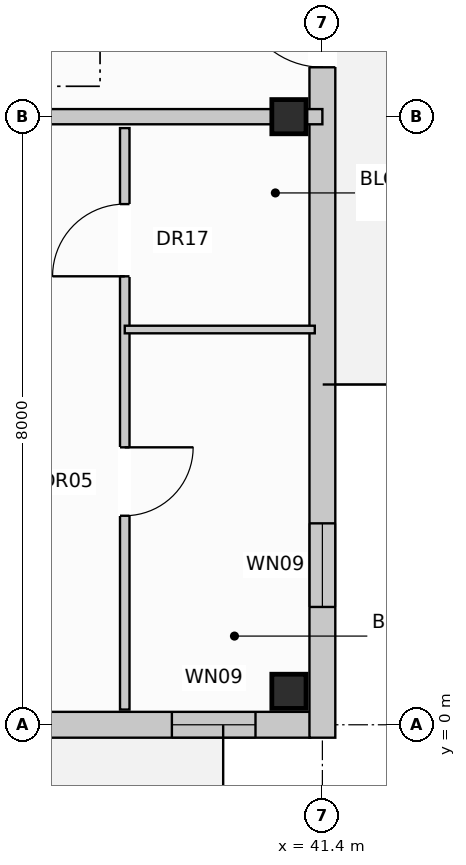
"""IFC4 building model, lengths in metres.
Left out: names, types, materials, properties, quantities, classifications, styles, units other than length and angle.
Written with IfcOpenShell. Run it as: python <this file> out.ifc"""

import sys

from ifc_helpers import new_model, si_unit, direction, frame, frame_2d, origin, origin_with_axes, origin_2d, place, context, subcontext, project, spatial, rectangle, extrude, element, fill, save


model = new_model("IFC4")
c1 = context("Model", 3, precision=1e-05, world=origin(), true_north=direction((0.0, 1.0)))
c2 = subcontext(c1, "Body", "Model", "MODEL_VIEW")
j1 = project(units=[si_unit("LENGTHUNIT", "METRE"), si_unit("PLANEANGLEUNIT", "RADIAN")], contexts=[c1])
p1 = place(None, origin())
s1 = spatial("IfcSite", under=j1, at=p1, CompositionType="ELEMENT")
p2 = place(p1, origin())
s2 = spatial("IfcBuilding", under=s1, at=p2, CompositionType="ELEMENT")
p3 = place(p2, frame((0.0, 0.0, 33.6)))
s3 = spatial("IfcBuildingStorey", under=s2, at=p3, CompositionType="ELEMENT", Elevation=33.6)
for number, where, z_axis, x_axis in (
    (1, (40.96, 0.44, 0.0), (0.0, 0.0, 1.0), (1.0, 0.0, 0.0)),
    (2, (40.96, 8.0, 0.0), (0.0, 0.0, 1.0), (1.0, 0.0, 0.0)),
):
    element("IfcColumn", number, at=place(p3, frame(where, z_axis=z_axis, x_axis=x_axis)), inside=s3, PredefinedType="COLUMN", context=c2, shape_type="SweptSolid", body=[
        extrude(rectangle(XDim=0.45, YDim=0.45, at=origin_2d()), origin(), (0.0, 0.0, 1.0), 3.2),
    ])
p4 = place(p3, frame((0.16, 0.0, 0.0), z_axis=(0.0, 0.0, 1.0), x_axis=(1.0, 0.0, 0.0)))
e3 = element("IfcWall", 3, at=p4, inside=s3, PredefinedType="STANDARD", context=c2, shape_type="SweptSolid", body=[
    extrude(rectangle(XDim=41.08, YDim=0.34, at=frame_2d((20.54, 0.0))), origin(), (0.0, 0.0, 1.0), 2.96),
])
p5 = place(p4, frame((2.465, 0.0, 0.0)))
e4 = element("IfcOpeningElement", 4, at=p5, cuts=e3, PredefinedType="OPENING", context=c2, shape_type="SweptSolid", body=[
    extrude(rectangle(XDim=1.05, YDim=2.12, at=frame_2d((0.525, 1.06))), frame((0.0, 0.182, 0.0), z_axis=(0.0, -1.0, 0.0), x_axis=(1.0, 0.0, 0.0)), (0.0, 0.0, 1.0), 0.364),
])
p6 = place(p4, frame((18.86, 0.0, 0.0)))
e5 = element("IfcOpeningElement", 5, at=p6, cuts=e3, PredefinedType="OPENING", context=c2, shape_type="SweptSolid", body=[
    extrude(rectangle(XDim=1.05, YDim=2.12, at=frame_2d((0.525, 1.06))), frame((0.0, 0.182, 0.0), z_axis=(0.0, -1.0, 0.0), x_axis=(1.0, 0.0, 0.0)), (0.0, 0.0, 1.0), 0.364),
])
p7 = place(p4, frame((32.66, 0.0, 0.0)))
e6 = element("IfcOpeningElement", 6, at=p7, cuts=e3, PredefinedType="OPENING", context=c2, shape_type="SweptSolid", body=[
    extrude(rectangle(XDim=1.05, YDim=2.12, at=frame_2d((0.525, 1.06))), frame((0.0, 0.182, 0.0), z_axis=(0.0, -1.0, 0.0), x_axis=(1.0, 0.0, 0.0)), (0.0, 0.0, 1.0), 0.364),
])
p8 = place(p4, frame((0.76, 0.0, 0.72)))
e7 = element("IfcOpeningElement", 7, at=p8, cuts=e3, PredefinedType="OPENING", context=c2, shape_type="SweptSolid", body=[
    extrude(rectangle(XDim=1.1, YDim=1.5, at=frame_2d((0.55, 0.75))), frame((0.0, 0.182, 0.0), z_axis=(0.0, -1.0, 0.0), x_axis=(1.0, 0.0, 0.0)), (0.0, 0.0, 1.0), 0.364),
])
p9 = place(p4, frame((4.26, 0.0, 0.72)))
e8 = element("IfcOpeningElement", 8, at=p9, cuts=e3, PredefinedType="OPENING", context=c2, shape_type="SweptSolid", body=[
    extrude(rectangle(XDim=1.9, YDim=1.85, at=frame_2d((0.95, 0.925))), frame((0.0, 0.182, 0.0), z_axis=(0.0, -1.0, 0.0), x_axis=(1.0, 0.0, 0.0)), (0.0, 0.0, 1.0), 0.364),
])
p10 = place(p4, frame((7.935, 0.0, 0.8)))
e9 = element("IfcOpeningElement", 9, at=p10, cuts=e3, PredefinedType="OPENING", context=c2, shape_type="SweptSolid", body=[
    extrude(rectangle(XDim=1.95, YDim=1.65, at=frame_2d((0.975, 0.825))), frame((0.0, 0.182, 0.0), z_axis=(0.0, -1.0, 0.0), x_axis=(1.0, 0.0, 0.0)), (0.0, 0.0, 1.0), 0.364),
])
p11 = place(p4, frame((11.66, 0.0, 0.72)))
e10 = element("IfcOpeningElement", 10, at=p11, cuts=e3, PredefinedType="OPENING", context=c2, shape_type="SweptSolid", body=[
    extrude(rectangle(XDim=1.1, YDim=1.5, at=frame_2d((0.55, 0.75))), frame((0.0, 0.182, 0.0), z_axis=(0.0, -1.0, 0.0), x_axis=(1.0, 0.0, 0.0)), (0.0, 0.0, 1.0), 0.364),
])
p12 = place(p4, frame((16.735, 0.0, 0.8)))
e11 = element("IfcOpeningElement", 11, at=p12, cuts=e3, PredefinedType="OPENING", context=c2, shape_type="SweptSolid", body=[
    extrude(rectangle(XDim=1.9, YDim=1.85, at=frame_2d((0.95, 0.925))), frame((0.0, 0.182, 0.0), z_axis=(0.0, -1.0, 0.0), x_axis=(1.0, 0.0, 0.0)), (0.0, 0.0, 1.0), 0.364),
])
p13 = place(p4, frame((22.235, 0.0, 0.8)))
e12 = element("IfcOpeningElement", 12, at=p13, cuts=e3, PredefinedType="OPENING", context=c2, shape_type="SweptSolid", body=[
    extrude(rectangle(XDim=1.95, YDim=1.65, at=frame_2d((0.975, 0.825))), frame((0.0, 0.182, 0.0), z_axis=(0.0, -1.0, 0.0), x_axis=(1.0, 0.0, 0.0)), (0.0, 0.0, 1.0), 0.364),
])
p14 = place(p4, frame((28.36, 0.0, 0.72)))
e13 = element("IfcOpeningElement", 13, at=p14, cuts=e3, PredefinedType="OPENING", context=c2, shape_type="SweptSolid", body=[
    extrude(rectangle(XDim=1.1, YDim=1.5, at=frame_2d((0.55, 0.75))), frame((0.0, 0.182, 0.0), z_axis=(0.0, -1.0, 0.0), x_axis=(1.0, 0.0, 0.0)), (0.0, 0.0, 1.0), 0.364),
])
p15 = place(p4, frame((30.46, 0.0, 0.8)))
e14 = element("IfcOpeningElement", 14, at=p15, cuts=e3, PredefinedType="OPENING", context=c2, shape_type="SweptSolid", body=[
    extrude(rectangle(XDim=1.9, YDim=1.85, at=frame_2d((0.95, 0.925))), frame((0.0, 0.182, 0.0), z_axis=(0.0, -1.0, 0.0), x_axis=(1.0, 0.0, 0.0)), (0.0, 0.0, 1.0), 0.364),
])
p16 = place(p4, frame((35.535, 0.0, 0.8)))
e15 = element("IfcOpeningElement", 15, at=p16, cuts=e3, PredefinedType="OPENING", context=c2, shape_type="SweptSolid", body=[
    extrude(rectangle(XDim=1.95, YDim=1.65, at=frame_2d((0.975, 0.825))), frame((0.0, 0.182, 0.0), z_axis=(0.0, -1.0, 0.0), x_axis=(1.0, 0.0, 0.0)), (0.0, 0.0, 1.0), 0.364),
])
p17 = place(p4, frame((39.26, 0.0, 0.72)))
e16 = element("IfcOpeningElement", 16, at=p17, cuts=e3, PredefinedType="OPENING", context=c2, shape_type="SweptSolid", body=[
    extrude(rectangle(XDim=1.1, YDim=1.5, at=frame_2d((0.55, 0.75))), frame((0.0, 0.182, 0.0), z_axis=(0.0, -1.0, 0.0), x_axis=(1.0, 0.0, 0.0)), (0.0, 0.0, 1.0), 0.364),
])
p18 = place(p3, frame((41.4, -0.17, 0.0), z_axis=(0.0, 0.0, 1.0), x_axis=(0.0, 1.0, 0.0)))
e17 = element("IfcWall", 17, at=p18, inside=s3, PredefinedType="STANDARD", context=c2, shape_type="SweptSolid", body=[
    extrude(rectangle(XDim=18.74, YDim=0.34, at=frame_2d((9.37, 0.0))), origin(), (0.0, 0.0, 1.0), 2.96),
])
p19 = place(p18, frame((8.82, 0.0, 0.0)))
e18 = element("IfcOpeningElement", 18, at=p19, cuts=e17, PredefinedType="OPENING", context=c2, shape_type="SweptSolid", body=[
    extrude(rectangle(XDim=1.1, YDim=2.1, at=frame_2d((0.55, 1.05))), frame((0.0, 0.182, 0.0), z_axis=(0.0, -1.0, 0.0), x_axis=(1.0, 0.0, 0.0)), (0.0, 0.0, 1.0), 0.364),
])
p20 = place(p18, frame((1.72, 0.0, 0.72)))
e19 = element("IfcOpeningElement", 19, at=p20, cuts=e17, PredefinedType="OPENING", context=c2, shape_type="SweptSolid", body=[
    extrude(rectangle(XDim=1.1, YDim=1.5, at=frame_2d((0.55, 0.75))), frame((0.0, 0.182, 0.0), z_axis=(0.0, -1.0, 0.0), x_axis=(1.0, 0.0, 0.0)), (0.0, 0.0, 1.0), 0.364),
])
p21 = place(p18, frame((15.92, 0.0, 0.72)))
e20 = element("IfcOpeningElement", 20, at=p21, cuts=e17, PredefinedType="OPENING", context=c2, shape_type="SweptSolid", body=[
    extrude(rectangle(XDim=1.1, YDim=1.5, at=frame_2d((0.55, 0.75))), frame((0.0, 0.182, 0.0), z_axis=(0.0, -1.0, 0.0), x_axis=(1.0, 0.0, 0.0)), (0.0, 0.0, 1.0), 0.364),
])
p22 = place(p3, frame((34.5, 8.0, 0.0), z_axis=(0.0, 0.0, 1.0), x_axis=(1.0, 0.0, 0.0)))
e21 = element("IfcWall", 21, at=p22, inside=s3, PredefinedType="PARTITIONING", context=c2, shape_type="SweptSolid", body=[
    extrude(rectangle(XDim=6.9, YDim=0.2, at=frame_2d((3.45, 0.0))), origin(), (0.0, 0.0, 1.0), 2.4),
])
p23 = place(p22, frame((2.0, 0.0, 0.0)))
e22 = element("IfcOpeningElement", 22, at=p23, cuts=e21, PredefinedType="OPENING", context=c2, shape_type="SweptSolid", body=[
    extrude(rectangle(XDim=0.95, YDim=2.15, at=frame_2d((0.475, 1.075))), frame((0.0, 0.112, 0.0), z_axis=(0.0, -1.0, 0.0), x_axis=(1.0, 0.0, 0.0)), (0.0, 0.0, 1.0), 0.224),
])
p24 = place(p3, frame((38.8, 7.85, 0.0), z_axis=(0.0, 0.0, 1.0), x_axis=(0.0, -1.0, 0.0)))
e23 = element("IfcWall", 23, at=p24, inside=s3, PredefinedType="PARTITIONING", context=c2, shape_type="SweptSolid", body=[
    extrude(rectangle(XDim=7.65, YDim=0.125, at=frame_2d((3.825, 0.0))), origin(), (0.0, 0.0, 1.0), 2.96),
])
p25 = place(p24, frame((1.0, 0.0, 0.0)))
e24 = element("IfcOpeningElement", 24, at=p25, cuts=e23, PredefinedType="OPENING", context=c2, shape_type="SweptSolid", body=[
    extrude(rectangle(XDim=0.95, YDim=2.1, at=frame_2d((0.475, 1.05))), frame((0.0, 0.074, 0.0), z_axis=(0.0, -1.0, 0.0), x_axis=(1.0, 0.0, 0.0)), (0.0, 0.0, 1.0), 0.149),
])
p26 = place(p24, frame((4.2, 0.0, 0.0)))
e25 = element("IfcOpeningElement", 25, at=p26, cuts=e23, PredefinedType="OPENING", context=c2, shape_type="SweptSolid", body=[
    extrude(rectangle(XDim=0.9, YDim=2.1, at=frame_2d((0.45, 1.05))), frame((0.0, 0.074, 0.0), z_axis=(0.0, -1.0, 0.0), x_axis=(1.0, 0.0, 0.0)), (0.0, 0.0, 1.0), 0.149),
])
p27 = place(p3, frame((38.8, 5.2, 0.0), z_axis=(0.0, 0.0, 1.0), x_axis=(1.0, 0.0, 0.0)))
e26 = element("IfcWall", 26, at=p27, inside=s3, PredefinedType="PARTITIONING", context=c2, shape_type="SweptSolid", body=[
    extrude(rectangle(XDim=2.5, YDim=0.1, at=frame_2d((1.25, 0.0))), origin(), (0.0, 0.0, 1.0), 2.96),
])
p28 = place(p17, origin_with_axes())
e27 = element("IfcWindow", 27, at=p28, inside=s3, PartitioningType="SINGLE_PANEL", PredefinedType="WINDOW", context=c2, shape_type="SweptSolid", body=[
    extrude(rectangle(XDim=1.1, YDim=1.5, at=frame_2d((0.55, 0.75))), frame((0.0, 0.03, 0.0), z_axis=(0.0, -1.0, 0.0), x_axis=(1.0, 0.0, 0.0)), (0.0, 0.0, 1.0), 0.06),
])
fill(e16, e27)
p29 = place(p19, origin_with_axes())
e28 = element("IfcDoor", 28, at=p29, inside=s3, OperationType="SINGLE_SWING_RIGHT", PredefinedType="DOOR", context=c2, shape_type="SweptSolid", body=[
    extrude(rectangle(XDim=1.1, YDim=2.1, at=frame_2d((0.55, 1.05))), frame((0.0, 0.025, 0.0), z_axis=(0.0, -1.0, 0.0), x_axis=(1.0, 0.0, 0.0)), (0.0, 0.0, 1.0), 0.05),
])
fill(e18, e28)
p30 = place(p20, origin_with_axes())
e29 = element("IfcWindow", 29, at=p30, inside=s3, PartitioningType="SINGLE_PANEL", PredefinedType="WINDOW", context=c2, shape_type="SweptSolid", body=[
    extrude(rectangle(XDim=1.1, YDim=1.5, at=frame_2d((0.55, 0.75))), frame((0.0, 0.03, 0.0), z_axis=(0.0, -1.0, 0.0), x_axis=(1.0, 0.0, 0.0)), (0.0, 0.0, 1.0), 0.06),
])
fill(e19, e29)
p31 = place(p25, frame((0.95, 0.0, 0.0), z_axis=(0.0, 0.0, 1.0), x_axis=(-1.0, 0.0, 0.0)))
e30 = element("IfcDoor", 30, at=p31, inside=s3, OperationType="SINGLE_SWING_RIGHT", PredefinedType="DOOR", context=c2, shape_type="SweptSolid", body=[
    extrude(rectangle(XDim=0.95, YDim=2.1, at=frame_2d((0.475, 1.05))), frame((0.0, 0.025, 0.0), z_axis=(0.0, -1.0, 0.0), x_axis=(1.0, 0.0, 0.0)), (0.0, 0.0, 1.0), 0.05),
])
fill(e24, e30)
p32 = place(p26, origin_with_axes())
e31 = element("IfcDoor", 31, at=p32, inside=s3, OperationType="SINGLE_SWING_LEFT", PredefinedType="DOOR", context=c2, shape_type="SweptSolid", body=[
    extrude(rectangle(XDim=0.9, YDim=2.1, at=frame_2d((0.45, 1.05))), frame((0.0, 0.025, 0.0), z_axis=(0.0, -1.0, 0.0), x_axis=(1.0, 0.0, 0.0)), (0.0, 0.0, 1.0), 0.05),
])
fill(e25, e31)
save(model, sys.argv[1])
